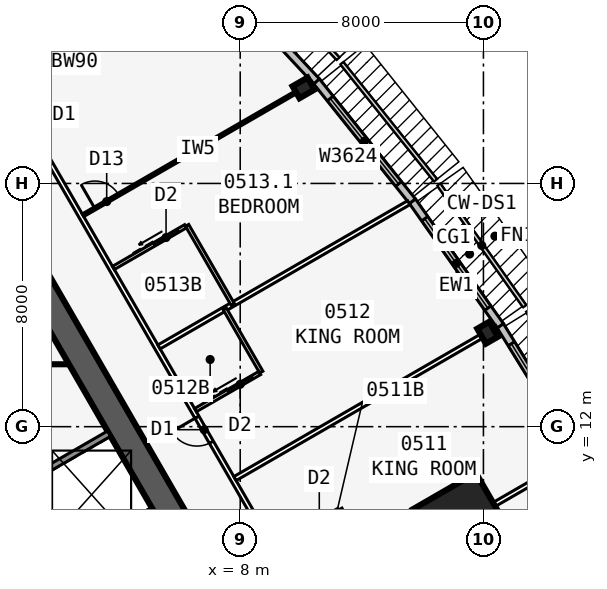
"""IFC4 building model, lengths in metres.
Left out: names, types, materials, properties, quantities, classifications, styles, units other than length and angle.
Written with IfcOpenShell. Run it as: python <this file> out.ifc"""

import sys

from ifc_helpers import new_model, si_unit, direction, frame, frame_2d, origin, origin_2d, place, context, subcontext, project, spatial, rectangle, i_section, extrude, element, fill, save


model = new_model("IFC4")
c1 = context("Model", 3, precision=1e-05, world=origin(), true_north=direction((0.0, 1.0)))
c2 = subcontext(c1, "Body", "Model", "MODEL_VIEW")
j1 = project(units=[si_unit("LENGTHUNIT", "METRE"), si_unit("PLANEANGLEUNIT", "RADIAN")], contexts=[c1])
p1 = place(None, origin())
s1 = spatial("IfcSite", under=j1, at=p1, CompositionType="ELEMENT")
p2 = place(p1, origin())
s2 = spatial("IfcBuilding", under=s1, at=p2, CompositionType="ELEMENT")
p3 = place(p2, frame((0.0, 0.0, 28.5)))
s3 = spatial("IfcBuildingStorey", under=s2, at=p3, CompositionType="ELEMENT", Elevation=28.5)
p4 = place(p3, frame((16.5, -9.526, 0.0), z_axis=(0.0, 0.0, 1.0), x_axis=(-0.499999749417, 0.866025548458, 0.0)))
e1 = element("IfcWall", 1, at=p4, inside=s3, PredefinedType="SHEAR", context=c2, shape_type="SweptSolid", body=[
    extrude(rectangle(XDim=33.0, YDim=0.9, at=frame_2d((16.5, 0.0))), origin(), (0.0, 0.0, 1.0), 3.4),
])
p5 = place(p4, frame((14.15, 0.0, 0.0)))
e2 = element("IfcOpeningElement", 2, at=p5, cuts=e1, PredefinedType="OPENING", context=c2, shape_type="SweptSolid", body=[
    extrude(rectangle(XDim=1.8, YDim=2.13, at=frame_2d((0.9, 1.065))), frame((0.0, 0.46, 0.0), z_axis=(0.0, -1.0, 0.0), x_axis=(1.0, 0.0, 0.0)), (0.0, 0.0, 1.0), 0.92),
])
p6 = place(p4, frame((12.6, 0.0, 0.0)))
e3 = element("IfcOpeningElement", 3, at=p6, cuts=e1, PredefinedType="OPENING", context=c2, shape_type="SweptSolid", body=[
    extrude(rectangle(XDim=1.0, YDim=2.13, at=frame_2d((0.5, 1.065))), frame((0.0, 0.46, 0.0), z_axis=(0.0, -1.0, 0.0), x_axis=(1.0, 0.0, 0.0)), (0.0, 0.0, 1.0), 0.92),
])
p7 = place(p3, frame((5.379, 2.586, 0.0), z_axis=(0.0, 0.0, 1.0), x_axis=(-0.500001375892, 0.866024609411, 0.0)))
e4 = element("IfcWall", 4, at=p7, inside=s3, PredefinedType="SOLIDWALL", context=c2, shape_type="SweptSolid", body=[
    extrude(rectangle(XDim=10.633, YDim=0.25, at=frame_2d((5.316, 0.0))), origin(), (0.0, 0.0, 1.0), 3.235),
])
p8 = place(p7, frame((9.164, 0.0, 0.0)))
e5 = element("IfcOpeningElement", 5, at=p8, cuts=e4, PredefinedType="OPENING", context=c2, shape_type="SweptSolid", body=[
    extrude(rectangle(XDim=0.9, YDim=2.13, at=frame_2d((0.45, 1.065))), frame((0.0, 0.135, 0.0), z_axis=(0.0, -1.0, 0.0), x_axis=(1.0, 0.0, 0.0)), (0.0, 0.0, 1.0), 0.27),
])
p9 = place(p7, frame((1.0, 0.0, 0.0)))
e6 = element("IfcOpeningElement", 6, at=p9, cuts=e4, PredefinedType="OPENING", context=c2, shape_type="SweptSolid", body=[
    extrude(rectangle(XDim=1.1, YDim=2.13, at=frame_2d((0.55, 1.065))), frame((0.0, 0.135, 0.0), z_axis=(0.0, -1.0, 0.0), x_axis=(1.0, 0.0, 0.0)), (0.0, 0.0, 1.0), 0.27),
])
p10 = place(p7, frame((3.9, 0.0, 0.0)))
e7 = element("IfcOpeningElement", 7, at=p10, cuts=e4, PredefinedType="OPENING", context=c2, shape_type="SweptSolid", body=[
    extrude(rectangle(XDim=1.1, YDim=2.13, at=frame_2d((0.55, 1.065))), frame((0.0, 0.135, 0.0), z_axis=(0.0, -1.0, 0.0), x_axis=(1.0, 0.0, 0.0)), (0.0, 0.0, 1.0), 0.27),
])
p11 = place(p7, frame((6.8, 0.0, 0.0)))
e8 = element("IfcOpeningElement", 8, at=p11, cuts=e4, PredefinedType="OPENING", context=c2, shape_type="SweptSolid", body=[
    extrude(rectangle(XDim=1.1, YDim=2.13, at=frame_2d((0.55, 1.065))), frame((0.0, 0.135, 0.0), z_axis=(0.0, -1.0, 0.0), x_axis=(1.0, 0.0, 0.0)), (0.0, 0.0, 1.0), 0.27),
])
for number, where, z_axis, x_axis in (
    (9, (2.429, 7.696, 0.0), (0.0, 0.0, 1.0), (0.866, 0.5, 0.0)),
    (10, (0.979, 10.207, 0.0), (0.0, 0.0, 1.0), (0.866, 0.5, 0.0)),
):
    element("IfcWall", number, at=place(p3, frame(where, z_axis=z_axis, x_axis=x_axis)), inside=s3, PredefinedType="SOLIDWALL", context=c2, shape_type="SweptSolid", body=[
        extrude(rectangle(XDim=3.125, YDim=0.2, at=frame_2d((1.562, 0.0))), origin(), (0.0, 0.0, 1.0), 3.235),
    ])
for number, where, z_axis, x_axis in (
    (11, (16.137, 15.09, 0.0), (0.0, 0.0, 1.0), (0.866, 0.5, 0.0)),
    (12, (10.083, 23.142, 0.0), (0.0, 0.0, 1.0), (-0.5, 0.866, 0.0)),
):
    element("IfcColumn", number, at=place(p3, frame(where, z_axis=z_axis, x_axis=x_axis)), inside=s3, PredefinedType="COLUMN", context=c2, shape_type="SweptSolid", body=[
        extrude(i_section(OverallWidth=0.455, OverallDepth=0.569, WebThickness=0.078, FlangeThickness=0.125, at=origin_2d()), origin(), (0.0, 0.0, 1.0), 3.4),
    ])
p12 = place(p3, frame((15.312, 8.84, 0.0), z_axis=(0.0, 0.0, 1.0), x_axis=(0.866025403784, 0.5, 0.0)))
e13 = element("IfcColumn", 13, at=p12, inside=s3, PredefinedType="COLUMN", context=c2, shape_type="SweptSolid", body=[
    extrude(rectangle(XDim=2.4, YDim=2.4, at=origin_2d()), origin(), (0.0, 0.0, 1.0), 3.4),
])
p13 = place(p3, frame((19.182, 11.071, 0.0), z_axis=(0.0, 0.0, 1.0), x_axis=(-0.526132807704, 0.850402415717, 0.0)))
e14 = element("IfcWall", 14, at=p13, inside=s3, PredefinedType="STANDARD", context=c2, shape_type="SweptSolid", body=[
    extrude(rectangle(XDim=5.002, YDim=0.25, at=frame_2d((2.501, 0.0))), origin(), (0.0, 0.0, 1.0), 3.235),
])
p14 = place(p13, frame((0.701, 0.0, 0.45)))
e15 = element("IfcOpeningElement", 15, at=p14, cuts=e14, PredefinedType="OPENING", context=c2, shape_type="SweptSolid", body=[
    extrude(rectangle(XDim=3.6, YDim=2.4, at=frame_2d((1.8, 1.2))), frame((0.0, 0.135, 0.0), z_axis=(0.0, -1.0, 0.0), x_axis=(1.0, 0.0, 0.0)), (0.0, 0.0, 1.0), 0.27),
])
p15 = place(p3, frame((16.555, 15.318, 0.0), z_axis=(0.0, 0.0, 1.0), x_axis=(-0.5766431066, 0.81699616132, 0.0)))
e16 = element("IfcWall", 16, at=p15, inside=s3, PredefinedType="STANDARD", context=c2, shape_type="SweptSolid", body=[
    extrude(rectangle(XDim=5.021, YDim=0.25, at=frame_2d((2.51, 0.0))), origin(), (0.0, 0.0, 1.0), 3.235),
])
p16 = place(p15, frame((0.71, 0.0, 0.45)))
e17 = element("IfcOpeningElement", 17, at=p16, cuts=e16, PredefinedType="OPENING", context=c2, shape_type="SweptSolid", body=[
    extrude(rectangle(XDim=3.6, YDim=2.4, at=frame_2d((1.8, 1.2))), frame((0.0, 0.135, 0.0), z_axis=(0.0, -1.0, 0.0), x_axis=(1.0, 0.0, 0.0)), (0.0, 0.0, 1.0), 0.27),
])
p17 = place(p3, frame((13.664, 19.414, 0.0), z_axis=(0.0, 0.0, 1.0), x_axis=(-0.624594965756, 0.780948864364, 0.0)))
e18 = element("IfcWall", 18, at=p17, inside=s3, PredefinedType="STANDARD", context=c2, shape_type="SweptSolid", body=[
    extrude(rectangle(XDim=5.058, YDim=0.25, at=frame_2d((2.529, 0.0))), origin(), (0.0, 0.0, 1.0), 3.235),
])
p18 = place(p17, frame((0.729, 0.0, 0.45)))
e19 = element("IfcOpeningElement", 19, at=p18, cuts=e18, PredefinedType="OPENING", context=c2, shape_type="SweptSolid", body=[
    extrude(rectangle(XDim=3.6, YDim=2.4, at=frame_2d((1.8, 1.2))), frame((0.0, 0.135, 0.0), z_axis=(0.0, -1.0, 0.0), x_axis=(1.0, 0.0, 0.0)), (0.0, 0.0, 1.0), 0.27),
])
p19 = place(p3, frame((10.511, 23.357, 0.0), z_axis=(0.0, 0.0, 1.0), x_axis=(-0.682289646561, 0.731081964075, 0.0)))
e20 = element("IfcWall", 20, at=p19, inside=s3, PredefinedType="STANDARD", context=c2, shape_type="SweptSolid", body=[
    extrude(rectangle(XDim=8.211, YDim=0.25, at=frame_2d((4.105, 0.0))), origin(), (0.0, 0.0, 1.0), 3.235),
])
p20 = place(p19, frame((2.006, 0.0, 0.45)))
e21 = element("IfcOpeningElement", 21, at=p20, cuts=e20, PredefinedType="OPENING", context=c2, shape_type="SweptSolid", body=[
    extrude(rectangle(XDim=4.2, YDim=2.4, at=frame_2d((2.1, 1.2))), frame((0.0, 0.135, 0.0), z_axis=(0.0, -1.0, 0.0), x_axis=(1.0, 0.0, 0.0)), (0.0, 0.0, 1.0), 0.27),
])
p21 = place(p3, frame((20.027, -10.985, 0.0), z_axis=(0.0, 0.0, 1.0), x_axis=(-0.500001677587, 0.866024435227, 0.0)))
e22 = element("IfcWall", 22, at=p21, inside=s3, PredefinedType="PARTITIONING", context=c2, shape_type="SweptSolid", body=[
    extrude(rectangle(XDim=39.054, YDim=0.15, at=frame_2d((19.527, 0.0))), origin(), (0.0, 0.0, 1.0), 3.235),
])
p22 = place(p21, frame((0.352, 0.0, 0.0)))
e23 = element("IfcOpeningElement", 23, at=p22, cuts=e22, PredefinedType="OPENING", context=c2, shape_type="SweptSolid", body=[
    extrude(rectangle(XDim=0.95, YDim=2.13, at=frame_2d((0.475, 1.065))), frame((0.0, 0.085, 0.0), z_axis=(0.0, -1.0, 0.0), x_axis=(1.0, 0.0, 0.0)), (0.0, 0.0, 1.0), 0.17),
])
p23 = place(p21, frame((5.952, 0.0, 0.0)))
e24 = element("IfcOpeningElement", 24, at=p23, cuts=e22, PredefinedType="OPENING", context=c2, shape_type="SweptSolid", body=[
    extrude(rectangle(XDim=0.95, YDim=2.13, at=frame_2d((0.475, 1.065))), frame((0.0, 0.085, 0.0), z_axis=(0.0, -1.0, 0.0), x_axis=(1.0, 0.0, 0.0)), (0.0, 0.0, 1.0), 0.17),
])
p24 = place(p21, frame((12.152, 0.0, 0.0)))
e25 = element("IfcOpeningElement", 25, at=p24, cuts=e22, PredefinedType="OPENING", context=c2, shape_type="SweptSolid", body=[
    extrude(rectangle(XDim=0.95, YDim=2.13, at=frame_2d((0.475, 1.065))), frame((0.0, 0.085, 0.0), z_axis=(0.0, -1.0, 0.0), x_axis=(1.0, 0.0, 0.0)), (0.0, 0.0, 1.0), 0.17),
])
p25 = place(p21, frame((15.952, 0.0, 0.0)))
e26 = element("IfcOpeningElement", 26, at=p25, cuts=e22, PredefinedType="OPENING", context=c2, shape_type="SweptSolid", body=[
    extrude(rectangle(XDim=0.95, YDim=2.13, at=frame_2d((0.475, 1.065))), frame((0.0, 0.085, 0.0), z_axis=(0.0, -1.0, 0.0), x_axis=(1.0, 0.0, 0.0)), (0.0, 0.0, 1.0), 0.17),
])
p26 = place(p21, frame((22.152, 0.0, 0.0)))
e27 = element("IfcOpeningElement", 27, at=p26, cuts=e22, PredefinedType="OPENING", context=c2, shape_type="SweptSolid", body=[
    extrude(rectangle(XDim=0.95, YDim=2.13, at=frame_2d((0.475, 1.065))), frame((0.0, 0.085, 0.0), z_axis=(0.0, -1.0, 0.0), x_axis=(1.0, 0.0, 0.0)), (0.0, 0.0, 1.0), 0.17),
])
p27 = place(p21, frame((25.952, 0.0, 0.0)))
e28 = element("IfcOpeningElement", 28, at=p27, cuts=e22, PredefinedType="OPENING", context=c2, shape_type="SweptSolid", body=[
    extrude(rectangle(XDim=0.95, YDim=2.13, at=frame_2d((0.475, 1.065))), frame((0.0, 0.085, 0.0), z_axis=(0.0, -1.0, 0.0), x_axis=(1.0, 0.0, 0.0)), (0.0, 0.0, 1.0), 0.17),
])
p28 = place(p21, frame((36.546, 0.0, 0.0)))
e29 = element("IfcOpeningElement", 29, at=p28, cuts=e22, PredefinedType="OPENING", context=c2, shape_type="SweptSolid", body=[
    extrude(rectangle(XDim=0.95, YDim=2.13, at=frame_2d((0.475, 1.065))), frame((0.0, 0.085, 0.0), z_axis=(0.0, -1.0, 0.0), x_axis=(1.0, 0.0, 0.0)), (0.0, 0.0, 1.0), 0.17),
])
p29 = place(p3, frame((10.329, 5.963, 0.0), z_axis=(0.0, 0.0, 1.0), x_axis=(0.866021688545, 0.500006434927, 0.0)))
e30 = element("IfcWall", 30, at=p29, inside=s3, PredefinedType="PARTITIONING", context=c2, shape_type="SweptSolid", body=[
    extrude(rectangle(XDim=10.096, YDim=0.15, at=frame_2d((5.048, 0.0))), origin(), (0.0, 0.0, 1.0), 2.389),
])
p30 = place(p3, frame((7.829, 10.293, 0.0), z_axis=(0.0, 0.0, 1.0), x_axis=(0.866016302457, 0.50001576363, 0.0)))
e31 = element("IfcWall", 31, at=p30, inside=s3, PredefinedType="PARTITIONING", context=c2, shape_type="SweptSolid", body=[
    extrude(rectangle(XDim=9.943, YDim=0.15, at=frame_2d((4.972, 0.0))), origin(), (0.0, 0.0, 1.0), 2.389),
])
p31 = place(p3, frame((5.329, 14.623, 0.0), z_axis=(0.0, 0.0, 1.0), x_axis=(0.866018409083, 0.500012114982, 0.0)))
e32 = element("IfcWall", 32, at=p31, inside=s3, PredefinedType="PARTITIONING", context=c2, shape_type="SweptSolid", body=[
    extrude(rectangle(XDim=9.485, YDim=0.15, at=frame_2d((4.742, 0.0))), origin(), (0.0, 0.0, 1.0), 2.389),
])
p32 = place(p3, frame((2.829, 18.954, 0.0), z_axis=(0.0, 0.0, 1.0), x_axis=(0.866020536561, 0.500008430184, 0.0)))
e33 = element("IfcWall", 33, at=p32, inside=s3, PredefinedType="PARTITIONING", context=c2, shape_type="SweptSolid", body=[
    extrude(rectangle(XDim=8.72, YDim=0.1, at=frame_2d((4.36, 0.0))), origin(), (0.0, 0.0, 1.0), 2.389),
])
p33 = place(p32, frame((0.45, 0.0, 0.0)))
e34 = element("IfcOpeningElement", 34, at=p33, cuts=e33, PredefinedType="OPENING", context=c2, shape_type="SweptSolid", body=[
    extrude(rectangle(XDim=0.9, YDim=2.13, at=frame_2d((0.45, 1.065))), frame((0.0, 0.06, 0.0), z_axis=(0.0, -1.0, 0.0), x_axis=(1.0, 0.0, 0.0)), (0.0, 0.0, 1.0), 0.12),
])
p34 = place(p3, frame((12.493, 7.213, 0.0), z_axis=(0.0, 0.0, 1.0), x_axis=(-0.500001309137, 0.866024647952, 0.0)))
e35 = element("IfcWall", 35, at=p34, inside=s3, PredefinedType="PLUMBINGWALL", context=c2, shape_type="SweptSolid", body=[
    extrude(rectangle(XDim=2.4, YDim=0.12, at=frame_2d((1.2, 0.0))), origin(), (0.0, 0.0, 1.0), 3.235),
])
p35 = place(p3, frame((9.128, 8.042, 0.0), z_axis=(0.0, 0.0, 1.0), x_axis=(0.866005645448, 0.500034220881, 0.0)))
e36 = element("IfcWall", 36, at=p35, inside=s3, PredefinedType="PLUMBINGWALL", context=c2, shape_type="SweptSolid", body=[
    extrude(rectangle(XDim=2.44, YDim=0.12, at=frame_2d((1.22, 0.0))), origin(), (0.0, 0.0, 1.0), 3.235),
])
p36 = place(p35, frame((1.25, 0.0, 0.0)))
e37 = element("IfcOpeningElement", 37, at=p36, cuts=e36, PredefinedType="OPENING", context=c2, shape_type="SweptSolid", body=[
    extrude(rectangle(XDim=0.9, YDim=2.13, at=frame_2d((0.45, 1.065))), frame((0.0, 0.07, 0.0), z_axis=(0.0, -1.0, 0.0), x_axis=(1.0, 0.0, 0.0)), (0.0, 0.0, 1.0), 0.14),
])
p37 = place(p3, frame((8.694, 13.795, 0.0), z_axis=(0.0, 0.0, 1.0), x_axis=(-0.500077600433, 0.865980596518, 0.0)))
e38 = element("IfcWall", 38, at=p37, inside=s3, PredefinedType="PLUMBINGWALL", context=c2, shape_type="SweptSolid", body=[
    extrude(rectangle(XDim=2.4, YDim=0.12, at=frame_2d((1.2, 0.0))), origin(), (0.0, 0.0, 1.0), 3.235),
])
p38 = place(p3, frame((6.529, 12.545, 0.0), z_axis=(0.0, 0.0, 1.0), x_axis=(0.866023955769, 0.500002508028, 0.0)))
e39 = element("IfcWall", 39, at=p38, inside=s3, PredefinedType="PLUMBINGWALL", context=c2, shape_type="SweptSolid", body=[
    extrude(rectangle(XDim=2.44, YDim=0.12, at=frame_2d((1.22, 0.0))), origin(), (0.0, 0.0, 1.0), 3.235),
])
p39 = place(p38, frame((1.25, 0.0, 0.0)))
e40 = element("IfcOpeningElement", 40, at=p39, cuts=e39, PredefinedType="OPENING", context=c2, shape_type="SweptSolid", body=[
    extrude(rectangle(XDim=0.9, YDim=2.13, at=frame_2d((0.45, 1.065))), frame((0.0, 0.07, 0.0), z_axis=(0.0, -1.0, 0.0), x_axis=(1.0, 0.0, 0.0)), (0.0, 0.0, 1.0), 0.14),
])
p40 = place(p3, frame((7.753, 16.023, 0.0), z_axis=(0.0, 0.0, 1.0), x_axis=(-0.499990139034, 0.866031096941, 0.0)))
e41 = element("IfcWall", 41, at=p40, inside=s3, PredefinedType="PLUMBINGWALL", context=c2, shape_type="SweptSolid", body=[
    extrude(rectangle(XDim=3.0, YDim=0.12, at=frame_2d((1.5, 0.0))), origin(), (0.0, 0.0, 1.0), 3.235),
])
p41 = place(p3, frame((3.829, 17.221, 0.0), z_axis=(0.0, 0.0, 1.0), x_axis=(0.865997131366, 0.500048966069, 0.0)))
e42 = element("IfcWall", 42, at=p41, inside=s3, PredefinedType="PLUMBINGWALL", context=c2, shape_type="SweptSolid", body=[
    extrude(rectangle(XDim=2.74, YDim=0.12, at=frame_2d((1.37, 0.0))), origin(), (0.0, 0.0, 1.0), 3.235),
])
p42 = place(p41, frame((1.55, 0.0, 0.0)))
e43 = element("IfcOpeningElement", 43, at=p42, cuts=e42, PredefinedType="OPENING", context=c2, shape_type="SweptSolid", body=[
    extrude(rectangle(XDim=0.9, YDim=2.13, at=frame_2d((0.45, 1.065))), frame((0.0, 0.07, 0.0), z_axis=(0.0, -1.0, 0.0), x_axis=(1.0, 0.0, 0.0)), (0.0, 0.0, 1.0), 0.14),
])
p43 = place(p3, frame((-2.367, 14.052, 0.0), z_axis=(0.0, 0.0, 1.0), x_axis=(1.0, 0.0, 0.0)))
e44 = element("IfcWall", 44, at=p43, inside=s3, PredefinedType="PARTITIONING", context=c2, shape_type="SweptSolid", body=[
    extrude(rectangle(XDim=4.734, YDim=0.1, at=frame_2d((2.367, 0.0))), origin(), (0.0, 0.0, 1.0), 3.235),
])
p44 = place(p43, frame((1.917, 0.0, 0.0)))
e45 = element("IfcOpeningElement", 45, at=p44, cuts=e44, PredefinedType="OPENING", context=c2, shape_type="SweptSolid", body=[
    extrude(rectangle(XDim=0.9, YDim=2.13, at=frame_2d((0.45, 1.065))), frame((0.0, 0.06, 0.0), z_axis=(0.0, -1.0, 0.0), x_axis=(1.0, 0.0, 0.0)), (0.0, 0.0, 1.0), 0.12),
])
p45 = place(p14, origin())
e46 = element("IfcWindow", 46, at=p45, inside=s3, PartitioningType="SINGLE_PANEL", PredefinedType="WINDOW", context=c2, shape_type="SweptSolid", body=[
    extrude(rectangle(XDim=3.6, YDim=2.4, at=frame_2d((1.8, 1.2))), frame((0.0, 0.03, 0.0), z_axis=(0.0, -1.0, 0.0), x_axis=(1.0, 0.0, 0.0)), (0.0, 0.0, 1.0), 0.06),
])
fill(e15, e46)
p46 = place(p16, origin())
e47 = element("IfcWindow", 47, at=p46, inside=s3, PartitioningType="SINGLE_PANEL", PredefinedType="WINDOW", context=c2, shape_type="SweptSolid", body=[
    extrude(rectangle(XDim=3.6, YDim=2.4, at=frame_2d((1.8, 1.2))), frame((0.0, 0.03, 0.0), z_axis=(0.0, -1.0, 0.0), x_axis=(1.0, 0.0, 0.0)), (0.0, 0.0, 1.0), 0.06),
])
fill(e17, e47)
p47 = place(p18, origin())
e48 = element("IfcWindow", 48, at=p47, inside=s3, PartitioningType="SINGLE_PANEL", PredefinedType="WINDOW", context=c2, shape_type="SweptSolid", body=[
    extrude(rectangle(XDim=3.6, YDim=2.4, at=frame_2d((1.8, 1.2))), frame((0.0, 0.03, 0.0), z_axis=(0.0, -1.0, 0.0), x_axis=(1.0, 0.0, 0.0)), (0.0, 0.0, 1.0), 0.06),
])
fill(e19, e48)
p48 = place(p33, origin())
e49 = element("IfcDoor", 49, at=p48, inside=s3, OperationType="SINGLE_SWING_LEFT", PredefinedType="DOOR", context=c2, shape_type="SweptSolid", body=[
    extrude(rectangle(XDim=0.9, YDim=2.13, at=frame_2d((0.45, 1.065))), frame((0.0, 0.025, 0.0), z_axis=(0.0, -1.0, 0.0), x_axis=(1.0, 0.0, 0.0)), (0.0, 0.0, 1.0), 0.05),
])
fill(e34, e49)
p49 = place(p39, origin())
e50 = element("IfcDoor", 50, at=p49, inside=s3, OperationType="SLIDING_TO_LEFT", PredefinedType="DOOR", context=c2, shape_type="SweptSolid", body=[
    extrude(rectangle(XDim=0.9, YDim=2.13, at=frame_2d((0.45, 1.065))), frame((0.0, 0.025, 0.0), z_axis=(0.0, -1.0, 0.0), x_axis=(1.0, 0.0, 0.0)), (0.0, 0.0, 1.0), 0.05),
])
fill(e40, e50)
p50 = place(p27, origin())
e51 = element("IfcDoor", 51, at=p50, inside=s3, OperationType="SINGLE_SWING_RIGHT", PredefinedType="DOOR", context=c2, shape_type="SweptSolid", body=[
    extrude(rectangle(XDim=0.95, YDim=2.13, at=frame_2d((0.475, 1.065))), frame((0.0, 0.025, 0.0), z_axis=(0.0, -1.0, 0.0), x_axis=(1.0, 0.0, 0.0)), (0.0, 0.0, 1.0), 0.05),
])
fill(e28, e51)
p51 = place(p42, origin())
e52 = element("IfcDoor", 52, at=p51, inside=s3, OperationType="SLIDING_TO_LEFT", PredefinedType="DOOR", context=c2, shape_type="SweptSolid", body=[
    extrude(rectangle(XDim=0.9, YDim=2.13, at=frame_2d((0.45, 1.065))), frame((0.0, 0.025, 0.0), z_axis=(0.0, -1.0, 0.0), x_axis=(1.0, 0.0, 0.0)), (0.0, 0.0, 1.0), 0.05),
])
fill(e43, e52)
p52 = place(p11, origin())
e53 = element("IfcDoor", 53, at=p52, inside=s3, OperationType="DOUBLE_DOOR_SLIDING", PredefinedType="USERDEFINED", context=c2, shape_type="SweptSolid", body=[
    extrude(rectangle(XDim=1.1, YDim=2.13, at=frame_2d((0.55, 1.065))), frame((0.0, 0.025, 0.0), z_axis=(0.0, -1.0, 0.0), x_axis=(1.0, 0.0, 0.0)), (0.0, 0.0, 1.0), 0.05),
])
fill(e8, e53)
save(model, sys.argv[1])
